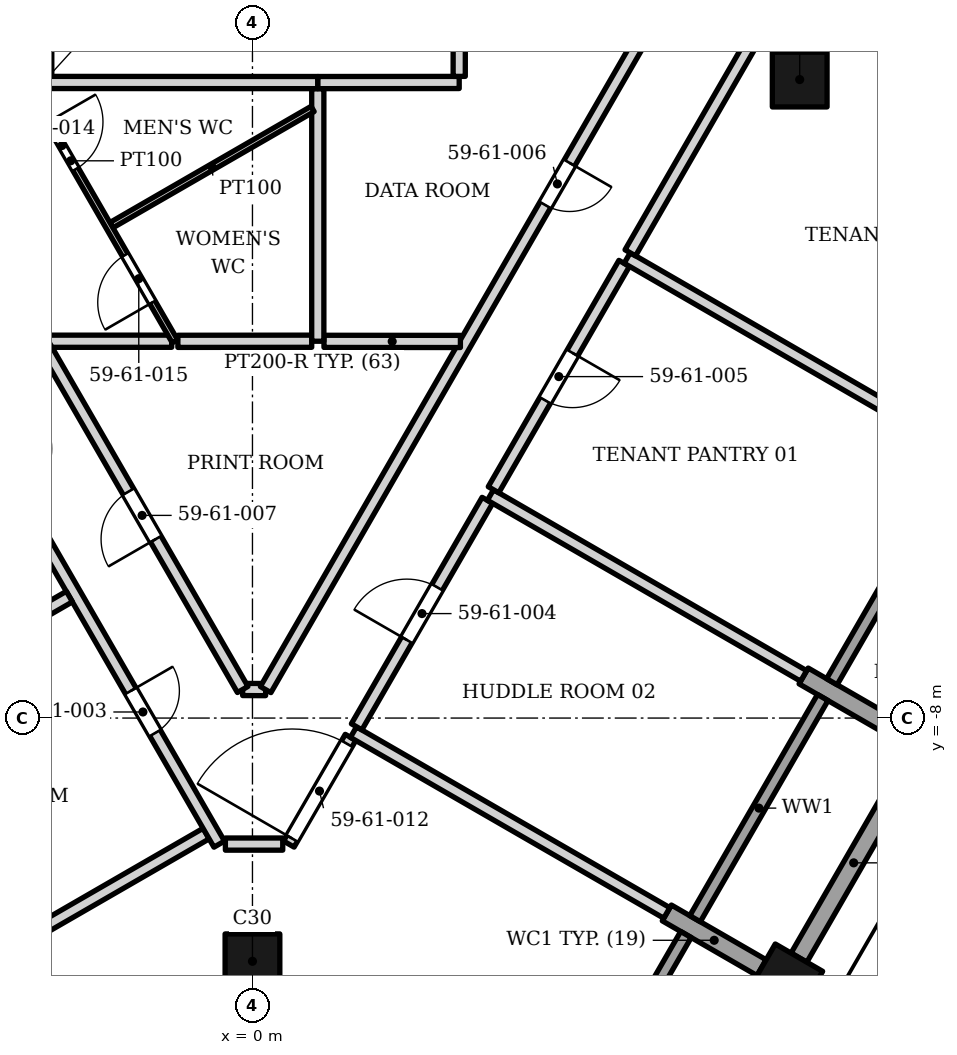
"""IFC4 building model, lengths in metres.
Left out: names, types, materials, properties, quantities, classifications, styles, units other than length and angle.
Written with IfcOpenShell. Run it as: python <this file> out.ifc"""

import sys

from ifc_helpers import new_model, si_unit, direction, frame, frame_2d, origin, origin_2d, place, context, subcontext, project, spatial, rectangle, extrude, element, fill, save


model = new_model("IFC4")
c1 = context("Model", 3, precision=1e-05, world=origin(), true_north=direction((0.0, 1.0)))
c2 = subcontext(c1, "Body", "Model", "MODEL_VIEW")
j1 = project(units=[si_unit("LENGTHUNIT", "METRE"), si_unit("PLANEANGLEUNIT", "RADIAN")], contexts=[c1])
p1 = place(None, origin())
s1 = spatial("IfcSite", under=j1, at=p1, CompositionType="ELEMENT")
p2 = place(p1, origin())
s2 = spatial("IfcBuilding", under=s1, at=p2, CompositionType="ELEMENT")
p3 = place(p2, frame((0.0, 0.0, 248.2)))
s3 = spatial("IfcBuildingStorey", under=s2, at=p3, CompositionType="ELEMENT", Elevation=248.2)
for number, where, z_axis, x_axis in (
    (1, (9.0, 2.5, 0.0), (0.0, 0.0, 1.0), (1.0, 0.0, 0.0)),
    (2, (0.0, -12.0, 0.0), (0.0, 0.0, 1.0), (1.0, 0.0, 0.0)),
    (3, (8.763, -12.33, 0.0), (0.0, 0.0, 1.0), (0.5, 0.866, 0.0)),
):
    element("IfcColumn", number, at=place(p3, frame(where, z_axis=z_axis, x_axis=x_axis)), inside=s3, PredefinedType="COLUMN", context=c2, shape_type="SweptSolid", body=[
        extrude(rectangle(XDim=0.9, YDim=0.9, at=origin_2d()), origin(), (0.0, 0.0, 1.0), 3.9),
    ])
p4 = place(p3, frame((8.373, -12.104, 0.0), z_axis=(0.0, 0.0, 1.0), x_axis=(-0.866047807691, 0.499961193289, 0.0)))
e4 = element("IfcWall", 4, at=p4, inside=s3, PredefinedType="SOLIDWALL", context=c2, shape_type="SweptSolid", body=[
    extrude(rectangle(XDim=1.8, YDim=0.3, at=frame_2d((0.9, 0.0))), origin(), (0.0, 0.0, 1.0), 2.95),
])
p5 = place(p3, frame((9.064, -7.307, 0.0), z_axis=(0.0, 0.0, 1.0), x_axis=(0.865989075817, -0.500062916607, 0.0)))
e5 = element("IfcWall", 5, at=p5, inside=s3, PredefinedType="SOLIDWALL", context=c2, shape_type="SweptSolid", body=[
    extrude(rectangle(XDim=1.8, YDim=0.3, at=frame_2d((0.9, 0.0))), origin(), (0.0, 0.0, 1.0), 3.0),
])
p6 = place(p3, frame((5.029, -15.197, 0.0), z_axis=(0.0, 0.0, 1.0), x_axis=(0.500002543286, 0.866023935413, 0.0)))
e6 = element("IfcWall", 6, at=p6, inside=s3, PredefinedType="ELEMENTEDWALL", context=c2, shape_type="SweptSolid", body=[
    extrude(rectangle(XDim=4.2, YDim=0.2, at=frame_2d((2.1, 0.0))), origin(), (0.0, 0.0, 1.0), 2.95),
])
p7 = place(p3, frame((8.988, -11.94, 0.0), z_axis=(0.0, 0.0, 1.0), x_axis=(0.500012057535, 0.866018442252, 0.0)))
e7 = element("IfcWall", 7, at=p7, inside=s3, PredefinedType="SOLIDWALL", context=c2, shape_type="SweptSolid", body=[
    extrude(rectangle(XDim=3.6, YDim=0.3, at=frame_2d((1.8, 0.0))), origin(), (0.0, 0.0, 1.0), 3.0),
])
p8 = place(p3, frame((7.279, -11.3, 0.0), z_axis=(0.0, 0.0, 1.0), x_axis=(0.500027713859, 0.866009402589, 0.0)))
e8 = element("IfcWall", 8, at=p8, inside=s3, PredefinedType="ELEMENTEDWALL", context=c2, shape_type="SweptSolid", body=[
    extrude(rectangle(XDim=4.2, YDim=0.2, at=frame_2d((2.1, 0.0))), origin(), (0.0, 0.0, 1.0), 3.0),
])
p9 = place(p3, frame((9.529, -7.403, 0.0), z_axis=(0.0, 0.0, 1.0), x_axis=(0.500002543286, 0.866023935413, 0.0)))
e9 = element("IfcWall", 9, at=p9, inside=s3, PredefinedType="ELEMENTEDWALL", context=c2, shape_type="SweptSolid", body=[
    extrude(rectangle(XDim=4.2, YDim=0.2, at=frame_2d((2.1, 0.0))), origin(), (0.0, 0.0, 1.0), 3.0),
])
p10 = place(p3, frame((-6.174, -13.023, 0.0), z_axis=(0.0, 0.0, 1.0), x_axis=(0.866143960209, 0.499794598003, 0.0)))
e10 = element("IfcWall", 10, at=p10, inside=s3, PredefinedType="PARTITIONING", context=c2, shape_type="SweptSolid", body=[
    extrude(rectangle(XDim=6.25, YDim=0.2, at=frame_2d((3.125, 0.0))), origin(), (0.0, 0.0, 1.0), 2.884),
])
p11 = place(p3, frame((-5.177, -2.054, 0.0), z_axis=(0.0, 0.0, 1.0), x_axis=(0.499987206771, -0.866032789833, 0.0)))
e11 = element("IfcWall", 11, at=p11, inside=s3, PredefinedType="PARTITIONING", context=c2, shape_type="SweptSolid", body=[
    extrude(rectangle(XDim=9.26, YDim=0.2, at=frame_2d((4.63, 0.0))), origin(), (0.0, 0.0, 1.0), 2.884),
])
p12 = place(p11, frame((1.75, 0.0, 0.0)))
e12 = element("IfcOpeningElement", 12, at=p12, cuts=e11, PredefinedType="OPENING", context=c2, shape_type="SweptSolid", body=[
    extrude(rectangle(XDim=1.0, YDim=2.1, at=frame_2d((0.5, 1.05))), frame((0.0, 0.11, 0.0), z_axis=(0.0, -1.0, 0.0), x_axis=(1.0, 0.0, 0.0)), (0.0, 0.0, 1.0), 0.22),
])
p13 = place(p11, frame((6.35, 0.0, 0.0)))
e13 = element("IfcOpeningElement", 13, at=p13, cuts=e11, PredefinedType="OPENING", context=c2, shape_type="SweptSolid", body=[
    extrude(rectangle(XDim=0.8, YDim=2.1, at=frame_2d((0.4, 1.05))), frame((0.0, 0.11, 0.0), z_axis=(0.0, -1.0, 0.0), x_axis=(1.0, 0.0, 0.0)), (0.0, 0.0, 1.0), 0.22),
])
p14 = place(p3, frame((-0.445, -10.073, 0.0), z_axis=(0.0, 0.0, 1.0), x_axis=(1.0, 0.0, 0.0)))
e14 = element("IfcWall", 14, at=p14, inside=s3, PredefinedType="PARTITIONING", context=c2, shape_type="SweptSolid", body=[
    extrude(rectangle(XDim=0.943, YDim=0.2, at=frame_2d((0.472, 0.0))), origin(), (0.0, 0.0, 1.0), 3.73),
])
p15 = place(p3, frame((0.598, -10.073, 0.0), z_axis=(0.0, 0.0, 1.0), x_axis=(0.500670744682, 0.865637802675, 0.0)))
e15 = element("IfcWall", 15, at=p15, inside=s3, PredefinedType="PARTITIONING", context=c2, shape_type="SweptSolid", body=[
    extrude(rectangle(XDim=2.028, YDim=0.2, at=frame_2d((1.014, 0.0))), origin(), (0.0, 0.0, 1.0), 3.73),
])
p16 = place(p15, frame((0.107, 0.0, 0.0)))
e16 = element("IfcOpeningElement", 16, at=p16, cuts=e15, PredefinedType="OPENING", context=c2, shape_type="SweptSolid", body=[
    extrude(rectangle(XDim=1.8, YDim=2.4, at=frame_2d((0.9, 1.2))), frame((0.0, 0.11, 0.0), z_axis=(0.0, -1.0, 0.0), x_axis=(1.0, 0.0, 0.0)), (0.0, 0.0, 1.0), 0.22),
])
p17 = place(p3, frame((1.661, -8.231, 0.0), z_axis=(0.0, 0.0, 1.0), x_axis=(0.866162357873, -0.499762713499, 0.0)))
e17 = element("IfcWall", 17, at=p17, inside=s3, PredefinedType="PARTITIONING", context=c2, shape_type="SweptSolid", body=[
    extrude(rectangle(XDim=5.95, YDim=0.2, at=frame_2d((2.975, 0.0))), origin(), (0.0, 0.0, 1.0), 2.884),
])
p18 = place(p3, frame((-0.161, -7.53, 0.0), z_axis=(0.0, 0.0, 1.0), x_axis=(0.999986611797, -0.005174574964, 0.0)))
e18 = element("IfcWall", 18, at=p18, inside=s3, PredefinedType="PARTITIONING", context=c2, shape_type="SweptSolid", body=[
    extrude(rectangle(XDim=0.377, YDim=0.2, at=frame_2d((0.189, 0.0))), origin(), (0.0, 0.0, 1.0), 3.73),
])
p19 = place(p3, frame((0.217, -7.532, 0.0), z_axis=(0.0, 0.0, 1.0), x_axis=(0.499766665369, 0.866160077691, 0.0)))
e19 = element("IfcWall", 19, at=p19, inside=s3, PredefinedType="PARTITIONING", context=c2, shape_type="SweptSolid", body=[
    extrude(rectangle(XDim=12.588, YDim=0.2, at=frame_2d((6.294, 0.0))), origin(), (0.0, 0.0, 1.0), 2.884),
])
p20 = place(p19, frame((9.201, 0.0, 0.0)))
e20 = element("IfcOpeningElement", 20, at=p20, cuts=e19, PredefinedType="OPENING", context=c2, shape_type="SweptSolid", body=[
    extrude(rectangle(XDim=0.8, YDim=2.1, at=frame_2d((0.4, 1.05))), frame((0.0, 0.11, 0.0), z_axis=(0.0, -1.0, 0.0), x_axis=(1.0, 0.0, 0.0)), (0.0, 0.0, 1.0), 0.22),
])
p21 = place(p3, frame((-8.424, -9.125, 0.0), z_axis=(0.0, 0.0, 1.0), x_axis=(0.866180383398, 0.499731471309, 0.0)))
e21 = element("IfcWall", 21, at=p21, inside=s3, PredefinedType="PARTITIONING", context=c2, shape_type="SweptSolid", body=[
    extrude(rectangle(XDim=6.25, YDim=0.2, at=frame_2d((3.125, 0.0))), origin(), (0.0, 0.0, 1.0), 2.884),
])
p22 = place(p3, frame((1.713, -8.144, 0.0), z_axis=(0.0, 0.0, 1.0), x_axis=(0.499986217557, 0.866033360935, 0.0)))
e22 = element("IfcWall", 22, at=p22, inside=s3, PredefinedType="PARTITIONING", context=c2, shape_type="SweptSolid", body=[
    extrude(rectangle(XDim=4.3, YDim=0.2, at=frame_2d((2.15, 0.0))), origin(), (0.0, 0.0, 1.0), 3.73),
])
p23 = place(p22, frame((1.65, 0.0, 0.0)))
e23 = element("IfcOpeningElement", 23, at=p23, cuts=e22, PredefinedType="OPENING", context=c2, shape_type="SweptSolid", body=[
    extrude(rectangle(XDim=1.0, YDim=2.1, at=frame_2d((0.5, 1.05))), frame((0.0, 0.11, 0.0), z_axis=(0.0, -1.0, 0.0), x_axis=(1.0, 0.0, 0.0)), (0.0, 0.0, 1.0), 0.22),
])
p24 = place(p3, frame((3.914, -4.332, 0.0), z_axis=(0.0, 0.0, 1.0), x_axis=(0.865897075154, -0.500222205864, 0.0)))
e24 = element("IfcWall", 24, at=p24, inside=s3, PredefinedType="PARTITIONING", context=c2, shape_type="SweptSolid", body=[
    extrude(rectangle(XDim=5.948, YDim=0.2, at=frame_2d((2.974, 0.0))), origin(), (0.0, 0.0, 1.0), 2.884),
])
p25 = place(p3, frame((1.176, -1.805, 0.0), z_axis=(0.0, 0.0, 1.0), x_axis=(0.999999709909, -0.000761697276, 0.0)))
e25 = element("IfcWall", 25, at=p25, inside=s3, PredefinedType="PARTITIONING", context=c2, shape_type="SweptSolid", body=[
    extrude(rectangle(XDim=2.244, YDim=0.2, at=frame_2d((1.122, 0.0))), origin(), (0.0, 0.0, 1.0), 3.73),
])
p26 = place(p3, frame((-3.37, -1.803, 0.0), z_axis=(0.0, 0.0, 1.0), x_axis=(0.999999992849, 0.000119588614, 0.0)))
e26 = element("IfcWall", 26, at=p26, inside=s3, PredefinedType="PARTITIONING", context=c2, shape_type="SweptSolid", body=[
    extrude(rectangle(XDim=2.042, YDim=0.2, at=frame_2d((1.021, 0.0))), origin(), (0.0, 0.0, 1.0), 3.73),
])
p27 = place(p3, frame((-1.227, -1.805, 0.0), z_axis=(0.0, 0.0, 1.0), x_axis=(0.999999698604, 0.000776397282, 0.0)))
e27 = element("IfcWall", 27, at=p27, inside=s3, PredefinedType="PARTITIONING", context=c2, shape_type="SweptSolid", body=[
    extrude(rectangle(XDim=2.201, YDim=0.2, at=frame_2d((1.101, 0.0))), origin(), (0.0, 0.0, 1.0), 3.73),
])
p28 = place(p3, frame((1.074, -1.803, 0.0), z_axis=(0.0, 0.0, 1.0), x_axis=(0.0, 1.0, 0.0)))
e28 = element("IfcWall", 28, at=p28, inside=s3, PredefinedType="PARTITIONING", context=c2, shape_type="SweptSolid", body=[
    extrude(rectangle(XDim=4.154, YDim=0.2, at=frame_2d((2.077, 0.0))), origin(), (0.0, 0.0, 1.0), 3.73),
])
p29 = place(p3, frame((3.964, -4.245, 0.0), z_axis=(0.0, 0.0, 1.0), x_axis=(0.499987977232, 0.866032345022, 0.0)))
e29 = element("IfcWall", 29, at=p29, inside=s3, PredefinedType="PARTITIONING", context=c2, shape_type="SweptSolid", body=[
    extrude(rectangle(XDim=4.298, YDim=0.2, at=frame_2d((2.149, 0.0))), origin(), (0.0, 0.0, 1.0), 2.884),
])
p30 = place(p29, frame((1.698, 0.0, 0.0)))
e30 = element("IfcOpeningElement", 30, at=p30, cuts=e29, PredefinedType="OPENING", context=c2, shape_type="SweptSolid", body=[
    extrude(rectangle(XDim=0.9, YDim=2.1, at=frame_2d((0.45, 1.05))), frame((0.0, 0.11, 0.0), z_axis=(0.0, -1.0, 0.0), x_axis=(1.0, 0.0, 0.0)), (0.0, 0.0, 1.0), 0.22),
])
p31 = place(p3, frame((6.163, -0.434, 0.0), z_axis=(0.0, 0.0, 1.0), x_axis=(0.865895092647, -0.500225637618, 0.0)))
e31 = element("IfcWall", 31, at=p31, inside=s3, PredefinedType="PARTITIONING", context=c2, shape_type="SweptSolid", body=[
    extrude(rectangle(XDim=5.949, YDim=0.2, at=frame_2d((2.975, 0.0))), origin(), (0.0, 0.0, 1.0), 3.052),
])
p32 = place(p3, frame((-2.32, 0.106, 0.0), z_axis=(0.0, 0.0, 1.0), x_axis=(0.866013238859, 0.500021069677, 0.0)))
e32 = element("IfcWall", 32, at=p32, inside=s3, PredefinedType="PARTITIONING", context=c2, shape_type="SweptSolid", body=[
    extrude(rectangle(XDim=3.822, YDim=0.1, at=frame_2d((1.911, 0.0))), origin(), (0.0, 0.0, 1.0), 2.884),
])
p33 = place(p3, frame((-3.4, 2.452, 0.0), z_axis=(0.0, 0.0, 1.0), x_axis=(0.999999927065, -0.000381929261, 0.0)))
e33 = element("IfcWall", 33, at=p33, inside=s3, PredefinedType="PARTITIONING", context=c2, shape_type="SweptSolid", body=[
    extrude(rectangle(XDim=4.475, YDim=0.2, at=frame_2d((2.237, 0.0))), origin(), (0.0, 0.0, 1.0), 3.73),
])
p34 = place(p3, frame((1.076, 2.451, 0.0), z_axis=(0.0, 0.0, 1.0), x_axis=(0.999999729558, 0.000735448425, 0.0)))
e34 = element("IfcWall", 34, at=p34, inside=s3, PredefinedType="PARTITIONING", context=c2, shape_type="SweptSolid", body=[
    extrude(rectangle(XDim=2.324, YDim=0.2, at=frame_2d((1.162, 0.0))), origin(), (0.0, 0.0, 1.0), 3.73),
])
p35 = place(p3, frame((-6.458, 3.37, 0.0), z_axis=(0.0, 0.0, 1.0), x_axis=(0.500262411632, -0.86587384734, 0.0)))
e35 = element("IfcWall", 35, at=p35, inside=s3, PredefinedType="PARTITIONING", context=c2, shape_type="SweptSolid", body=[
    extrude(rectangle(XDim=12.589, YDim=0.2, at=frame_2d((6.294, 0.0))), origin(), (0.0, 0.0, 1.0), 2.884),
])
p36 = place(p35, frame((8.832, 0.0, 0.0)))
e36 = element("IfcOpeningElement", 36, at=p36, cuts=e35, PredefinedType="OPENING", context=c2, shape_type="SweptSolid", body=[
    extrude(rectangle(XDim=0.9, YDim=2.1, at=frame_2d((0.45, 1.05))), frame((0.0, 0.11, 0.0), z_axis=(0.0, -1.0, 0.0), x_axis=(1.0, 0.0, 0.0)), (0.0, 0.0, 1.0), 0.22),
])
p37 = place(p35, frame((2.488, 0.0, 0.0)))
e37 = element("IfcOpeningElement", 37, at=p37, cuts=e35, PredefinedType="OPENING", context=c2, shape_type="SweptSolid", body=[
    extrude(rectangle(XDim=1.0, YDim=2.1, at=frame_2d((0.5, 1.05))), frame((0.0, 0.11, 0.0), z_axis=(0.0, -1.0, 0.0), x_axis=(1.0, 0.0, 0.0)), (0.0, 0.0, 1.0), 0.22),
])
p38 = place(p3, frame((6.214, -0.349, 0.0), z_axis=(0.0, 0.0, 1.0), x_axis=(0.499747517155, 0.866171125758, 0.0)))
e38 = element("IfcWall", 38, at=p38, inside=s3, PredefinedType="PARTITIONING", context=c2, shape_type="SweptSolid", body=[
    extrude(rectangle(XDim=4.497, YDim=0.2, at=frame_2d((2.249, 0.0))), origin(), (0.0, 0.0, 1.0), 3.73),
])
p39 = place(p3, frame((-4.702, 4.132, 0.0), z_axis=(0.0, 0.0, 1.0), x_axis=(0.499966025771, -0.866045017926, 0.0)))
e39 = element("IfcWall", 39, at=p39, inside=s3, PredefinedType="PARTITIONING", context=c2, shape_type="SweptSolid", body=[
    extrude(rectangle(XDim=6.854, YDim=0.1, at=frame_2d((3.427, 0.0))), origin(), (0.0, 0.0, 1.0), 2.884),
])
p40 = place(p39, frame((2.688, 0.0, 0.0)))
e40 = element("IfcOpeningElement", 40, at=p40, cuts=e39, PredefinedType="OPENING", context=c2, shape_type="SweptSolid", body=[
    extrude(rectangle(XDim=0.9, YDim=2.1, at=frame_2d((0.45, 1.05))), frame((0.0, 0.06, 0.0), z_axis=(0.0, -1.0, 0.0), x_axis=(1.0, 0.0, 0.0)), (0.0, 0.0, 1.0), 0.12),
])
p41 = place(p39, frame((5.216, 0.0, 0.0)))
e41 = element("IfcOpeningElement", 41, at=p41, cuts=e39, PredefinedType="OPENING", context=c2, shape_type="SweptSolid", body=[
    extrude(rectangle(XDim=0.9, YDim=2.1, at=frame_2d((0.45, 1.05))), frame((0.0, 0.06, 0.0), z_axis=(0.0, -1.0, 0.0), x_axis=(1.0, 0.0, 0.0)), (0.0, 0.0, 1.0), 0.12),
])
p42 = place(p3, frame((3.4, 2.552, 0.0), z_axis=(0.0, 0.0, 1.0), x_axis=(0.001150250857, 0.999999338461, 0.0)))
e42 = element("IfcWall", 42, at=p42, inside=s3, PredefinedType="PARTITIONING", context=c2, shape_type="SweptSolid", body=[
    extrude(rectangle(XDim=1.698, YDim=0.2, at=frame_2d((0.849, 0.0))), origin(), (0.0, 0.0, 1.0), 3.73),
])
p43 = place(p13, origin())
e43 = element("IfcDoor", 43, at=p43, inside=s3, OperationType="SINGLE_SWING_LEFT", PredefinedType="DOOR", context=c2, shape_type="SweptSolid", body=[
    extrude(rectangle(XDim=0.8, YDim=2.1, at=frame_2d((0.4, 1.05))), frame((0.0, 0.025, 0.0), z_axis=(0.0, -1.0, 0.0), x_axis=(1.0, 0.0, 0.0)), (0.0, 0.0, 1.0), 0.05),
])
fill(e13, e43)
p44 = place(p23, origin())
e44 = element("IfcDoor", 44, at=p44, inside=s3, OperationType="SINGLE_SWING_LEFT", PredefinedType="DOOR", context=c2, shape_type="SweptSolid", body=[
    extrude(rectangle(XDim=1.0, YDim=2.1, at=frame_2d((0.5, 1.05))), frame((0.0, 0.025, 0.0), z_axis=(0.0, -1.0, 0.0), x_axis=(1.0, 0.0, 0.0)), (0.0, 0.0, 1.0), 0.05),
])
fill(e23, e44)
p45 = place(p30, origin())
e45 = element("IfcDoor", 45, at=p45, inside=s3, OperationType="SINGLE_SWING_RIGHT", PredefinedType="DOOR", context=c2, shape_type="SweptSolid", body=[
    extrude(rectangle(XDim=0.9, YDim=2.1, at=frame_2d((0.45, 1.05))), frame((0.0, 0.025, 0.0), z_axis=(0.0, -1.0, 0.0), x_axis=(1.0, 0.0, 0.0)), (0.0, 0.0, 1.0), 0.05),
])
fill(e30, e45)
p46 = place(p20, origin())
e46 = element("IfcDoor", 46, at=p46, inside=s3, OperationType="SINGLE_SWING_RIGHT", PredefinedType="DOOR", context=c2, shape_type="SweptSolid", body=[
    extrude(rectangle(XDim=0.8, YDim=2.1, at=frame_2d((0.4, 1.05))), frame((0.0, 0.025, 0.0), z_axis=(0.0, -1.0, 0.0), x_axis=(1.0, 0.0, 0.0)), (0.0, 0.0, 1.0), 0.05),
])
fill(e20, e46)
p47 = place(p36, origin())
e47 = element("IfcDoor", 47, at=p47, inside=s3, OperationType="SINGLE_SWING_RIGHT", PredefinedType="DOOR", context=c2, shape_type="SweptSolid", body=[
    extrude(rectangle(XDim=0.9, YDim=2.1, at=frame_2d((0.45, 1.05))), frame((0.0, 0.025, 0.0), z_axis=(0.0, -1.0, 0.0), x_axis=(1.0, 0.0, 0.0)), (0.0, 0.0, 1.0), 0.05),
])
fill(e36, e47)
p48 = place(p16, origin())
e48 = element("IfcDoor", 48, at=p48, inside=s3, OperationType="DOUBLE_DOOR_SINGLE_SWING", PredefinedType="DOOR", context=c2, shape_type="SweptSolid", body=[
    extrude(rectangle(XDim=1.8, YDim=2.4, at=frame_2d((0.9, 1.2))), frame((0.0, 0.025, 0.0), z_axis=(0.0, -1.0, 0.0), x_axis=(1.0, 0.0, 0.0)), (0.0, 0.0, 1.0), 0.05),
])
fill(e16, e48)
p49 = place(p40, origin())
e49 = element("IfcDoor", 49, at=p49, inside=s3, OperationType="SINGLE_SWING_LEFT", PredefinedType="DOOR", context=c2, shape_type="SweptSolid", body=[
    extrude(rectangle(XDim=0.9, YDim=2.1, at=frame_2d((0.45, 1.05))), frame((0.0, 0.025, 0.0), z_axis=(0.0, -1.0, 0.0), x_axis=(1.0, 0.0, 0.0)), (0.0, 0.0, 1.0), 0.05),
])
fill(e40, e49)
p50 = place(p41, origin())
e50 = element("IfcDoor", 50, at=p50, inside=s3, OperationType="SINGLE_SWING_RIGHT", PredefinedType="DOOR", context=c2, shape_type="SweptSolid", body=[
    extrude(rectangle(XDim=0.9, YDim=2.1, at=frame_2d((0.45, 1.05))), frame((0.0, 0.025, 0.0), z_axis=(0.0, -1.0, 0.0), x_axis=(1.0, 0.0, 0.0)), (0.0, 0.0, 1.0), 0.05),
])
fill(e41, e50)
save(model, sys.argv[1])
